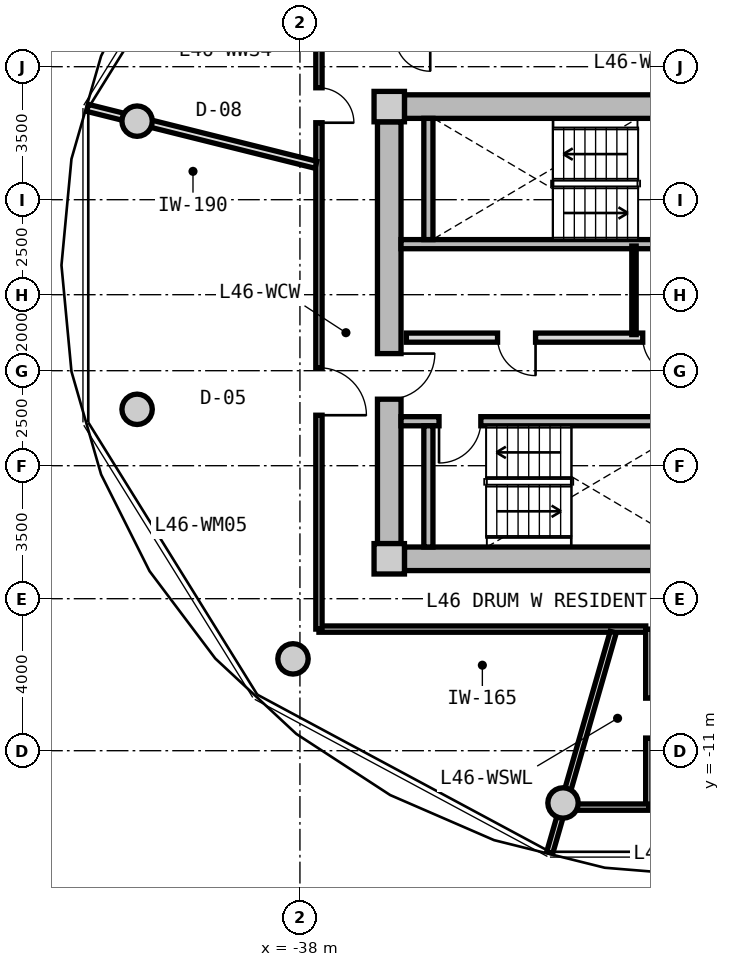
"""IFC4 building model, lengths in metres.
Left out: names, types, materials, properties, quantities, classifications, styles, units other than length and angle.
Written with IfcOpenShell. Run it as: python <this file> out.ifc"""

import sys

from ifc_helpers import new_model, si_unit, direction, frame, frame_2d, origin, origin_2d, place, context, subcontext, project, spatial, rectangle, circle, extrude, source, transform, mapped, element, fill, save


model = new_model("IFC4")
c1 = context("Model", 3, precision=1e-05, world=origin(), true_north=direction((0.0, 1.0)))
c2 = subcontext(c1, "Body", "Model", "MODEL_VIEW")
j1 = project(units=[si_unit("LENGTHUNIT", "METRE"), si_unit("PLANEANGLEUNIT", "RADIAN")], contexts=[c1])
p1 = place(None, origin())
s1 = spatial("IfcSite", under=j1, at=p1, CompositionType="ELEMENT")
p2 = place(p1, origin())
s2 = spatial("IfcBuilding", under=s1, at=p2, CompositionType="ELEMENT")
p3 = place(p2, frame((0.0, 0.0, 149.55)))
s3 = spatial("IfcBuildingStorey", under=s2, at=p3, CompositionType="ELEMENT", Elevation=149.55)
m1 = source(origin(), c2, "Body", "SweptSolid", [
    extrude(rectangle(XDim=0.8, YDim=0.8, at=origin_2d()), origin(), (0.0, 0.0, 1.0), 3.05),
])
for number, where, z_axis, x_axis in (
    (1, (-35.65, -5.95, 0.0), (0.0, 0.0, 1.0), (1.0, 0.0, 0.0)),
    (2, (-35.65, 5.95, 0.0), (0.0, 0.0, 1.0), (1.0, 0.0, 0.0)),
):
    element("IfcColumn", number, at=place(p3, frame(where, z_axis=z_axis, x_axis=x_axis)), inside=s3, PredefinedType="COLUMN", context=c2, shape_type="MappedRepresentation", body=[
        mapped(m1, transform((0.0, 0.0, 0.0), x_axis=(1.0, 0.0, 0.0), y_axis=(0.0, 1.0, 0.0), z_axis=(0.0, 0.0, 1.0), scale=1.0)),
    ])
m2 = source(origin(), c2, "Body", "SweptSolid", [
    extrude(rectangle(XDim=14.5, YDim=0.62, at=frame_2d((7.25, 0.0))), origin(), (0.0, 0.0, 1.0), 2.81),
])
for number, where, z_axis, x_axis in (
    (3, (-35.25, 5.95, 0.0), (0.0, 0.0, 1.0), (1.0, 0.0, 0.0)),
    (4, (-20.75, -5.95, 0.0), (0.0, 0.0, 1.0), (-1.0, 0.0, 0.0)),
):
    element("IfcWall", number, at=place(p3, frame(where, z_axis=z_axis, x_axis=x_axis)), inside=s3, PredefinedType="SHEAR", context=c2, shape_type="MappedRepresentation", body=[
        mapped(m2, transform((0.0, 0.0, 0.0), x_axis=(1.0, 0.0, 0.0), y_axis=(0.0, 1.0, 0.0), z_axis=(0.0, 0.0, 1.0), scale=1.0)),
    ])
m3 = source(origin(), c2, "Body", "SweptSolid", [
    extrude(rectangle(XDim=11.1, YDim=0.62, at=frame_2d((5.55, 0.0))), origin(), (0.0, 0.0, 1.0), 2.81),
])
p4 = place(p3, frame((-35.65, -5.55, 0.0), z_axis=(0.0, 0.0, 1.0), x_axis=(0.0, 1.0, 0.0)))
e5 = element("IfcWall", 5, at=p4, inside=s3, PredefinedType="SHEAR", context=c2, shape_type="MappedRepresentation", body=[
    mapped(m3, transform((0.0, 0.0, 0.0), x_axis=(1.0, 0.0, 0.0), y_axis=(0.0, 1.0, 0.0), z_axis=(0.0, 0.0, 1.0), scale=1.0)),
])
p5 = place(p4, frame((3.8, 0.0, 0.0)))
e6 = element("IfcOpeningElement", 6, at=p5, cuts=e5, PredefinedType="OPENING", context=c2, shape_type="SweptSolid", body=[
    extrude(rectangle(XDim=1.2, YDim=2.15, at=frame_2d((0.6, 1.075))), frame((0.0, 0.32, 0.0), z_axis=(0.0, -1.0, 0.0), x_axis=(1.0, 0.0, 0.0)), (0.0, 0.0, 1.0), 0.64),
])
m4 = source(origin(), c2, "Body", "SweptSolid", [
    extrude(circle(Radius=0.4, at=origin_2d()), origin(), (0.0, 0.0, 1.0), 3.05),
])
for number, where, z_axis, x_axis in (
    (7, (-42.285, 5.567, 0.0), (0.0, 0.0, 1.0), (1.0, 0.0, 0.0)),
    (8, (-42.285, -2.016, 0.0), (0.0, 0.0, 1.0), (1.0, 0.0, 0.0)),
    (9, (-38.183, -8.584, 0.0), (0.0, 0.0, 1.0), (1.0, 0.0, 0.0)),
    (10, (-31.077, -12.375, 0.0), (0.0, 0.0, 1.0), (1.0, 0.0, 0.0)),
):
    element("IfcColumn", number, at=place(p3, frame(where, z_axis=z_axis, x_axis=x_axis)), inside=s3, PredefinedType="COLUMN", context=c2, shape_type="MappedRepresentation", body=[
        mapped(m4, transform((0.0, 0.0, 0.0), x_axis=(1.0, 0.0, 0.0), y_axis=(0.0, 1.0, 0.0), z_axis=(0.0, 0.0, 1.0), scale=1.0)),
    ])
m5 = source(origin(), c2, "Body", "SweptSolid", [
    extrude(rectangle(XDim=7.88, YDim=0.24, at=frame_2d((3.94, 0.0))), origin(), (0.0, 0.0, 1.0), 2.81),
])
p6 = place(p3, frame((-35.34, 2.33, 0.0), z_axis=(0.0, 0.0, 1.0), x_axis=(1.0, 0.0, 0.0)))
e11 = element("IfcWall", 11, at=p6, inside=s3, PredefinedType="PARTITIONING", context=c2, shape_type="MappedRepresentation", body=[
    mapped(m5, transform((0.0, 0.0, 0.0), x_axis=(1.0, 0.0, 0.0), y_axis=(0.0, 1.0, 0.0), z_axis=(0.0, 0.0, 1.0), scale=1.0)),
])
m6 = source(origin(), c2, "Body", "SweptSolid", [
    extrude(rectangle(XDim=3.19, YDim=0.24, at=frame_2d((1.595, 0.0))), origin(), (0.0, 0.0, 1.0), 2.81),
])
p7 = place(p3, frame((-34.62, 2.45, 0.0), z_axis=(0.0, 0.0, 1.0), x_axis=(0.0, 1.0, 0.0)))
e12 = element("IfcWall", 12, at=p7, inside=s3, PredefinedType="PARTITIONING", context=c2, shape_type="MappedRepresentation", body=[
    mapped(m6, transform((0.0, 0.0, 0.0), x_axis=(1.0, 0.0, 0.0), y_axis=(0.0, 1.0, 0.0), z_axis=(0.0, 0.0, 1.0), scale=1.0)),
])
p8 = place(p3, frame((-35.34, -2.33, 0.0), z_axis=(0.0, 0.0, 1.0), x_axis=(1.0, 0.0, 0.0)))
e13 = element("IfcWall", 13, at=p8, inside=s3, PredefinedType="PARTITIONING", context=c2, shape_type="MappedRepresentation", body=[
    mapped(m5, transform((0.0, 0.0, 0.0), x_axis=(1.0, 0.0, 0.0), y_axis=(0.0, 1.0, 0.0), z_axis=(0.0, 0.0, 1.0), scale=1.0)),
])
p9 = place(p8, frame((1.0, 0.0, 0.0)))
e14 = element("IfcOpeningElement", 14, at=p9, cuts=e13, PredefinedType="OPENING", context=c2, shape_type="SweptSolid", body=[
    extrude(rectangle(XDim=1.1, YDim=2.15, at=frame_2d((0.55, 1.075))), frame((0.0, 0.13, 0.0), z_axis=(0.0, -1.0, 0.0), x_axis=(1.0, 0.0, 0.0)), (0.0, 0.0, 1.0), 0.26),
])
p10 = place(p3, frame((-34.62, -5.64, 0.0), z_axis=(0.0, 0.0, 1.0), x_axis=(0.0, 1.0, 0.0)))
e15 = element("IfcWall", 15, at=p10, inside=s3, PredefinedType="PARTITIONING", context=c2, shape_type="MappedRepresentation", body=[
    mapped(m6, transform((0.0, 0.0, 0.0), x_axis=(1.0, 0.0, 0.0), y_axis=(0.0, 1.0, 0.0), z_axis=(0.0, 0.0, 1.0), scale=1.0)),
])
m7 = source(origin(), c2, "Body", "SweptSolid", [
    extrude(rectangle(XDim=7.62, YDim=0.24, at=frame_2d((3.81, 0.0))), origin(), (0.0, 0.0, 1.0), 2.795),
])
p11 = place(p3, frame((-35.2, -0.13, 0.0), z_axis=(0.0, 0.0, 1.0), x_axis=(1.0, 0.0, 0.0)))
e16 = element("IfcWall", 16, at=p11, inside=s3, PredefinedType="PARTITIONING", context=c2, shape_type="MappedRepresentation", body=[
    mapped(m7, transform((0.0, 0.0, 0.0), x_axis=(1.0, 0.0, 0.0), y_axis=(0.0, 1.0, 0.0), z_axis=(0.0, 0.0, 1.0), scale=1.0)),
])
p12 = place(p11, frame((6.22, 0.0, 0.0)))
e17 = element("IfcOpeningElement", 17, at=p12, cuts=e16, PredefinedType="OPENING", context=c2, shape_type="SweptSolid", body=[
    extrude(rectangle(XDim=1.0, YDim=2.1, at=frame_2d((0.5, 1.05))), frame((0.0, 0.13, 0.0), z_axis=(0.0, -1.0, 0.0), x_axis=(1.0, 0.0, 0.0)), (0.0, 0.0, 1.0), 0.26),
])
p13 = place(p11, frame((2.4, 0.0, 0.0)))
e18 = element("IfcOpeningElement", 18, at=p13, cuts=e16, PredefinedType="OPENING", context=c2, shape_type="SweptSolid", body=[
    extrude(rectangle(XDim=1.0, YDim=2.1, at=frame_2d((0.5, 1.05))), frame((0.0, 0.13, 0.0), z_axis=(0.0, -1.0, 0.0), x_axis=(1.0, 0.0, 0.0)), (0.0, 0.0, 1.0), 0.26),
])
m8 = source(origin(), c2, "Body", "SweptSolid", [
    extrude(rectangle(XDim=2.33, YDim=0.115, at=frame_2d((1.165, 0.0))), origin(), (0.0, 0.0, 1.0), 2.795),
])
p14 = place(p3, frame((-29.21, -0.05, 0.0), z_axis=(0.0, 0.0, 1.0), x_axis=(0.0, 1.0, 0.0)))
e19 = element("IfcWall", 19, at=p14, inside=s3, PredefinedType="PARTITIONING", context=c2, shape_type="MappedRepresentation", body=[
    mapped(m8, transform((0.0, 0.0, 0.0), x_axis=(1.0, 0.0, 0.0), y_axis=(0.0, 1.0, 0.0), z_axis=(0.0, 0.0, 1.0), scale=1.0)),
])
m9 = source(origin(), c2, "Body", "SweptSolid", [
    extrude(rectangle(XDim=8.6, YDim=0.165, at=frame_2d((4.3, 0.0))), origin(), (0.0, 0.0, 1.0), 2.795),
])
p15 = place(p3, frame((-28.9, -7.8, 0.0), z_axis=(0.0, 0.0, 1.0), x_axis=(-1.0, 0.0, 0.0)))
e20 = element("IfcWall", 20, at=p15, inside=s3, PredefinedType="PARTITIONING", context=c2, shape_type="MappedRepresentation", body=[
    mapped(m9, transform((0.0, 0.0, 0.0), x_axis=(1.0, 0.0, 0.0), y_axis=(0.0, 1.0, 0.0), z_axis=(0.0, 0.0, 1.0), scale=1.0)),
])
m10 = source(origin(), c2, "Body", "SweptSolid", [
    extrude(rectangle(XDim=15.6, YDim=0.165, at=frame_2d((7.8, 0.0))), origin(), (0.0, 0.0, 1.0), 2.795),
])
p16 = place(p3, frame((-37.5, -7.8, 0.0), z_axis=(0.0, 0.0, 1.0), x_axis=(0.0, 1.0, 0.0)))
e21 = element("IfcWall", 21, at=p16, inside=s3, PredefinedType="PARTITIONING", context=c2, shape_type="MappedRepresentation", body=[
    mapped(m10, transform((0.0, 0.0, 0.0), x_axis=(1.0, 0.0, 0.0), y_axis=(0.0, 1.0, 0.0), z_axis=(0.0, 0.0, 1.0), scale=1.0)),
])
p17 = place(p16, frame((13.325, 0.0, 0.0)))
e22 = element("IfcOpeningElement", 22, at=p17, cuts=e21, PredefinedType="OPENING", context=c2, shape_type="SweptSolid", body=[
    extrude(rectangle(XDim=0.92, YDim=2.1, at=frame_2d((0.46, 1.05))), frame((0.0, 0.093, 0.0), z_axis=(0.0, -1.0, 0.0), x_axis=(1.0, 0.0, 0.0)), (0.0, 0.0, 1.0), 0.185),
])
p18 = place(p16, frame((5.628, 0.0, 0.0)))
e23 = element("IfcOpeningElement", 23, at=p18, cuts=e21, PredefinedType="OPENING", context=c2, shape_type="SweptSolid", body=[
    extrude(rectangle(XDim=1.25, YDim=2.2, at=frame_2d((0.625, 1.1))), frame((0.0, 0.093, 0.0), z_axis=(0.0, -1.0, 0.0), x_axis=(1.0, 0.0, 0.0)), (0.0, 0.0, 1.0), 0.185),
])
m11 = source(origin(), c2, "Body", "SweptSolid", [
    extrude(rectangle(XDim=6.035, YDim=0.165, at=frame_2d((3.018, 0.0))), origin(), (0.0, 0.0, 1.0), 2.345),
])
p19 = place(p3, frame((-29.756, -7.88, 0.0), z_axis=(0.0, 0.0, 1.0), x_axis=(-0.276809454862, -0.960924828329, 0.0)))
e24 = element("IfcWall", 24, at=p19, inside=s3, PredefinedType="PARTITIONING", context=c2, shape_type="MappedRepresentation", body=[
    mapped(m11, transform((0.0, 0.0, 0.0), x_axis=(1.0, 0.0, 0.0), y_axis=(0.0, 1.0, 0.0), z_axis=(0.0, 0.0, 1.0), scale=1.0)),
])
m12 = source(origin(), c2, "Body", "SweptSolid", [
    extrude(rectangle(XDim=4.685, YDim=0.165, at=frame_2d((2.342, 0.0))), origin(), (0.0, 0.0, 1.0), 2.795),
])
p20 = place(p3, frame((-28.82, -12.485, 0.0), z_axis=(0.0, 0.0, 1.0), x_axis=(0.0, 1.0, 0.0)))
e25 = element("IfcWall", 25, at=p20, inside=s3, PredefinedType="PARTITIONING", context=c2, shape_type="MappedRepresentation", body=[
    mapped(m12, transform((0.0, 0.0, 0.0), x_axis=(1.0, 0.0, 0.0), y_axis=(0.0, 1.0, 0.0), z_axis=(0.0, 0.0, 1.0), scale=1.0)),
])
p21 = place(p20, frame((1.817, 0.0, 0.0)))
e26 = element("IfcOpeningElement", 26, at=p21, cuts=e25, PredefinedType="OPENING", context=c2, shape_type="SweptSolid", body=[
    extrude(rectangle(XDim=1.05, YDim=2.15, at=frame_2d((0.525, 1.075))), frame((0.0, 0.093, 0.0), z_axis=(0.0, -1.0, 0.0), x_axis=(1.0, 0.0, 0.0)), (0.0, 0.0, 1.0), 0.185),
])
m13 = source(origin(), c2, "Body", "SweptSolid", [
    extrude(rectangle(XDim=2.419, YDim=0.165, at=frame_2d((1.209, 0.0))), origin(), (0.0, 0.0, 1.0), 2.345),
])
p22 = place(p3, frame((-31.239, -12.485, 0.0), z_axis=(0.0, 0.0, 1.0), x_axis=(1.0, 0.0, 0.0)))
e27 = element("IfcWall", 27, at=p22, inside=s3, PredefinedType="PARTITIONING", context=c2, shape_type="MappedRepresentation", body=[
    mapped(m13, transform((0.0, 0.0, 0.0), x_axis=(1.0, 0.0, 0.0), y_axis=(0.0, 1.0, 0.0), z_axis=(0.0, 0.0, 1.0), scale=1.0)),
])
m14 = source(origin(), c2, "Body", "SweptSolid", [
    extrude(rectangle(XDim=6.193, YDim=0.19, at=frame_2d((3.096, 0.0))), origin(), (0.0, 0.0, 1.0), 2.345),
])
p23 = place(p3, frame((-37.58, 4.419, 0.0), z_axis=(0.0, 0.0, 1.0), x_axis=(-0.970309243466, 0.241867674657, 0.0)))
e28 = element("IfcWall", 28, at=p23, inside=s3, PredefinedType="PARTITIONING", context=c2, shape_type="MappedRepresentation", body=[
    mapped(m14, transform((0.0, 0.0, 0.0), x_axis=(1.0, 0.0, 0.0), y_axis=(0.0, 1.0, 0.0), z_axis=(0.0, 0.0, 1.0), scale=1.0)),
])
m15 = source(origin(), c2, "Body", "SweptSolid", [
    extrude(rectangle(XDim=1.1, YDim=2.15, at=frame_2d((0.55, 1.075))), frame((0.0, 0.025, 0.0), z_axis=(0.0, -1.0, 0.0), x_axis=(1.0, 0.0, 0.0)), (0.0, 0.0, 1.0), 0.05),
])
p24 = place(p9, frame((1.1, 0.0, 0.0), z_axis=(0.0, 0.0, 1.0), x_axis=(-1.0, 0.0, 0.0)))
e29 = element("IfcDoor", 29, at=p24, inside=s3, OperationType="SINGLE_SWING_RIGHT", PredefinedType="DOOR", context=c2, shape_type="MappedRepresentation", body=[
    mapped(m15, transform((0.0, 0.0, 0.0), x_axis=(1.0, 0.0, 0.0), y_axis=(0.0, 1.0, 0.0), z_axis=(0.0, 0.0, 1.0), scale=1.0)),
])
fill(e14, e29)
m16 = source(origin(), c2, "Body", "SweptSolid", [
    extrude(rectangle(XDim=1.2, YDim=2.15, at=frame_2d((0.6, 1.075))), frame((0.0, 0.025, 0.0), z_axis=(0.0, -1.0, 0.0), x_axis=(1.0, 0.0, 0.0)), (0.0, 0.0, 1.0), 0.05),
])
p25 = place(p5, frame((1.2, 0.0, 0.0), z_axis=(0.0, 0.0, 1.0), x_axis=(-1.0, 0.0, 0.0)))
e30 = element("IfcDoor", 30, at=p25, inside=s3, OperationType="SINGLE_SWING_LEFT", PredefinedType="DOOR", context=c2, shape_type="MappedRepresentation", body=[
    mapped(m16, transform((0.0, 0.0, 0.0), x_axis=(1.0, 0.0, 0.0), y_axis=(0.0, 1.0, 0.0), z_axis=(0.0, 0.0, 1.0), scale=1.0)),
])
fill(e6, e30)
m17 = source(origin(), c2, "Body", "SweptSolid", [
    extrude(rectangle(XDim=1.0, YDim=2.1, at=frame_2d((0.5, 1.05))), frame((0.0, 0.025, 0.0), z_axis=(0.0, -1.0, 0.0), x_axis=(1.0, 0.0, 0.0)), (0.0, 0.0, 1.0), 0.05),
])
p26 = place(p12, frame((1.0, 0.0, 0.0), z_axis=(0.0, 0.0, 1.0), x_axis=(-1.0, 0.0, 0.0)))
e31 = element("IfcDoor", 31, at=p26, inside=s3, OperationType="SINGLE_SWING_LEFT", PredefinedType="DOOR", context=c2, shape_type="MappedRepresentation", body=[
    mapped(m17, transform((0.0, 0.0, 0.0), x_axis=(1.0, 0.0, 0.0), y_axis=(0.0, 1.0, 0.0), z_axis=(0.0, 0.0, 1.0), scale=1.0)),
])
fill(e17, e31)
p27 = place(p13, frame((1.0, 0.0, 0.0), z_axis=(0.0, 0.0, 1.0), x_axis=(-1.0, 0.0, 0.0)))
e32 = element("IfcDoor", 32, at=p27, inside=s3, OperationType="SINGLE_SWING_LEFT", PredefinedType="DOOR", context=c2, shape_type="MappedRepresentation", body=[
    mapped(m17, transform((0.0, 0.0, 0.0), x_axis=(1.0, 0.0, 0.0), y_axis=(0.0, 1.0, 0.0), z_axis=(0.0, 0.0, 1.0), scale=1.0)),
])
fill(e18, e32)
m18 = source(origin(), c2, "Body", "SweptSolid", [
    extrude(rectangle(XDim=1.05, YDim=2.15, at=frame_2d((0.525, 1.075))), frame((0.0, 0.025, 0.0), z_axis=(0.0, -1.0, 0.0), x_axis=(1.0, 0.0, 0.0)), (0.0, 0.0, 1.0), 0.05),
])
p28 = place(p21, frame((1.05, 0.0, 0.0), z_axis=(0.0, 0.0, 1.0), x_axis=(-1.0, 0.0, 0.0)))
e33 = element("IfcDoor", 33, at=p28, inside=s3, OperationType="SINGLE_SWING_RIGHT", PredefinedType="DOOR", context=c2, shape_type="MappedRepresentation", body=[
    mapped(m18, transform((0.0, 0.0, 0.0), x_axis=(1.0, 0.0, 0.0), y_axis=(0.0, 1.0, 0.0), z_axis=(0.0, 0.0, 1.0), scale=1.0)),
])
fill(e26, e33)
m19 = source(origin(), c2, "Body", "SweptSolid", [
    extrude(rectangle(XDim=0.92, YDim=2.1, at=frame_2d((0.46, 1.05))), frame((0.0, 0.025, 0.0), z_axis=(0.0, -1.0, 0.0), x_axis=(1.0, 0.0, 0.0)), (0.0, 0.0, 1.0), 0.05),
])
p29 = place(p17, frame((0.92, 0.0, 0.0), z_axis=(0.0, 0.0, 1.0), x_axis=(-1.0, 0.0, 0.0)))
e34 = element("IfcDoor", 34, at=p29, inside=s3, OperationType="SINGLE_SWING_RIGHT", PredefinedType="DOOR", context=c2, shape_type="MappedRepresentation", body=[
    mapped(m19, transform((0.0, 0.0, 0.0), x_axis=(1.0, 0.0, 0.0), y_axis=(0.0, 1.0, 0.0), z_axis=(0.0, 0.0, 1.0), scale=1.0)),
])
fill(e22, e34)
m20 = source(origin(), c2, "Body", "SweptSolid", [
    extrude(rectangle(XDim=1.25, YDim=2.2, at=frame_2d((0.625, 1.1))), frame((0.0, 0.025, 0.0), z_axis=(0.0, -1.0, 0.0), x_axis=(1.0, 0.0, 0.0)), (0.0, 0.0, 1.0), 0.05),
])
p30 = place(p18, frame((1.25, 0.0, 0.0), z_axis=(0.0, 0.0, 1.0), x_axis=(-1.0, 0.0, 0.0)))
e35 = element("IfcDoor", 35, at=p30, inside=s3, OperationType="SINGLE_SWING_RIGHT", PredefinedType="DOOR", context=c2, shape_type="MappedRepresentation", body=[
    mapped(m20, transform((0.0, 0.0, 0.0), x_axis=(1.0, 0.0, 0.0), y_axis=(0.0, 1.0, 0.0), z_axis=(0.0, 0.0, 1.0), scale=1.0)),
])
fill(e23, e35)
save(model, sys.argv[1])
